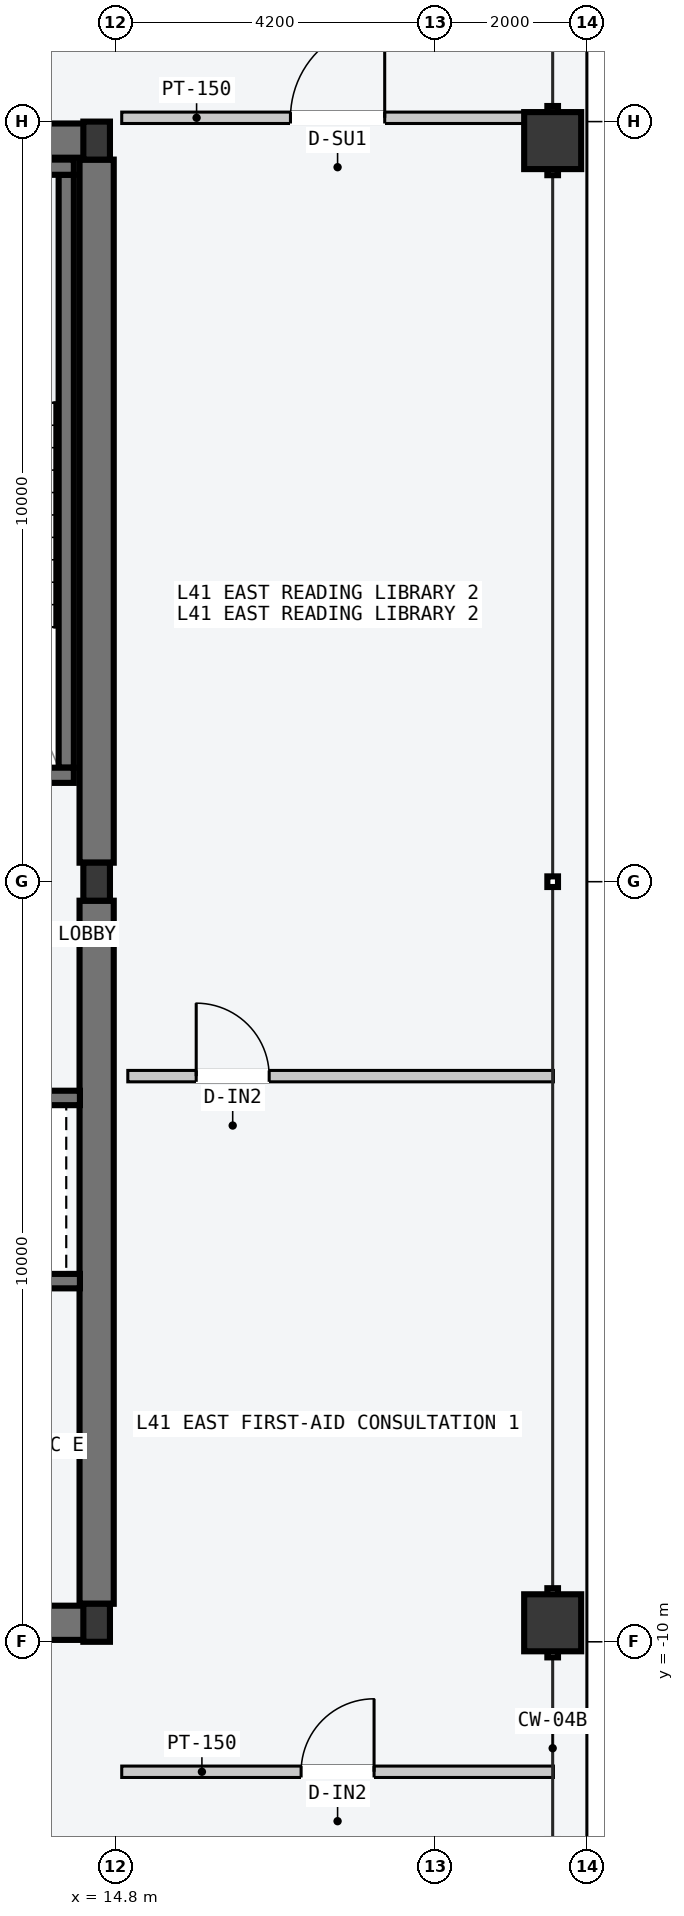
"""IFC4 building model, lengths in metres.
Left out: names, types, materials, properties, quantities, classifications, styles, units other than length and angle.
Written with IfcOpenShell. Run it as: python <this file> out.ifc"""

import sys

from ifc_helpers import new_model, si_unit, direction, frame, frame_2d, origin, origin_2d, place, context, subcontext, project, spatial, rectangle, hollow_rectangle, i_section, extrude, element, fill, save


model = new_model("IFC4")
c1 = context("Model", 3, precision=1e-05, world=origin(), true_north=direction((0.0, 1.0)))
c2 = subcontext(c1, "Body", "Model", "MODEL_VIEW")
j1 = project(units=[si_unit("LENGTHUNIT", "METRE"), si_unit("PLANEANGLEUNIT", "RADIAN")], contexts=[c1])
p1 = place(None, origin())
s1 = spatial("IfcSite", under=j1, at=p1, CompositionType="ELEMENT")
p2 = place(p1, origin())
s2 = spatial("IfcBuilding", under=s1, at=p2, CompositionType="ELEMENT")
p3 = place(p2, frame((0.0, 0.0, 158.7)))
s3 = spatial("IfcBuildingStorey", under=s2, at=p3, CompositionType="ELEMENT", Elevation=158.7)
for number, where, z_axis, x_axis in (
    (1, (8.07, -9.75, -0.2), (0.0, 0.0, 1.0), (1.0, 0.0, 0.0)),
    (2, (8.07, 9.75, -0.2), (0.0, 0.0, 1.0), (1.0, 0.0, 0.0)),
):
    element("IfcWall", number, at=place(p3, frame(where, z_axis=z_axis, x_axis=x_axis)), inside=s3, PredefinedType="SHEAR", context=c2, shape_type="SweptSolid", body=[
        extrude(rectangle(XDim=6.46, YDim=0.45, at=frame_2d((3.23, 0.0))), origin(), (0.0, 0.0, 1.0), 3.6),
    ])
for number, where, z_axis, x_axis in (
    (3, (14.55, -9.5, -0.2), (0.0, 0.0, 1.0), (0.0, 1.0, 0.0)),
    (4, (14.55, 0.25, -0.2), (0.0, 0.0, 1.0), (0.0, 1.0, 0.0)),
):
    element("IfcWall", number, at=place(p3, frame(where, z_axis=z_axis, x_axis=x_axis)), inside=s3, PredefinedType="SHEAR", context=c2, shape_type="SweptSolid", body=[
        extrude(rectangle(XDim=9.25, YDim=0.45, at=frame_2d((4.625, 0.0))), origin(), (0.0, 0.0, 1.0), 3.6),
    ])
p4 = place(p3, frame((14.15, 1.5, -0.2), z_axis=(0.0, 0.0, 1.0), x_axis=(0.0, 1.0, 0.0)))
e5 = element("IfcWall", 5, at=p4, inside=s3, PredefinedType="SOLIDWALL", context=c2, shape_type="SweptSolid", body=[
    extrude(rectangle(XDim=7.8, YDim=0.2, at=frame_2d((3.9, 0.0))), origin(), (0.0, 0.0, 1.0), 3.6),
])
p5 = place(p3, frame((10.53, 1.4, -0.2), z_axis=(0.0, 0.0, 1.0), x_axis=(1.0, 0.0, 0.0)))
e6 = element("IfcWall", 6, at=p5, inside=s3, PredefinedType="SOLIDWALL", context=c2, shape_type="SweptSolid", body=[
    extrude(rectangle(XDim=3.72, YDim=0.2, at=frame_2d((1.86, 0.0))), origin(), (0.0, 0.0, 1.0), 3.6),
])
p6 = place(p5, frame((1.5, 0.0, 0.2)))
e7 = element("IfcOpeningElement", 7, at=p6, cuts=e6, PredefinedType="OPENING", context=c2, shape_type="SweptSolid", body=[
    extrude(rectangle(XDim=1.12, YDim=2.18, at=frame_2d((0.56, 1.09))), frame((0.0, 0.11, 0.0), z_axis=(0.0, -1.0, 0.0), x_axis=(1.0, 0.0, 0.0)), (0.0, 0.0, 1.0), 0.22),
])
p7 = place(p3, frame((10.53, 9.4, -0.2), z_axis=(0.0, 0.0, 1.0), x_axis=(1.0, 0.0, 0.0)))
e8 = element("IfcWall", 8, at=p7, inside=s3, PredefinedType="SOLIDWALL", context=c2, shape_type="SweptSolid", body=[
    extrude(rectangle(XDim=3.72, YDim=0.2, at=frame_2d((1.86, 0.0))), origin(), (0.0, 0.0, 1.0), 3.6),
])
for number, where, z_axis, x_axis in (
    (9, (14.55, -9.75, 0.0), (0.0, 0.0, 1.0), (1.0, 0.0, 0.0)),
    (10, (14.55, 0.0, 0.0), (0.0, 0.0, 1.0), (1.0, 0.0, 0.0)),
    (11, (14.55, 9.75, 0.0), (0.0, 0.0, 1.0), (1.0, 0.0, 0.0)),
):
    element("IfcColumn", number, at=place(p3, frame(where, z_axis=z_axis, x_axis=x_axis)), inside=s3, PredefinedType="COLUMN", context=c2, shape_type="SweptSolid", body=[
        extrude(i_section(OverallWidth=0.35, OverallDepth=0.5, WebThickness=0.02, FlangeThickness=0.032, at=origin_2d()), origin(), (0.0, 0.0, 1.0), 3.6),
    ])
for number, where, z_axis, x_axis in (
    (12, (20.55, -9.75, 0.0), (0.0, 0.0, 1.0), (0.0, 1.0, 0.0)),
    (13, (20.55, 9.75, 0.0), (0.0, 0.0, 1.0), (0.0, 1.0, 0.0)),
):
    element("IfcColumn", number, at=place(p3, frame(where, z_axis=z_axis, x_axis=x_axis)), inside=s3, PredefinedType="COLUMN", context=c2, shape_type="SweptSolid", body=[
        extrude(hollow_rectangle(XDim=0.75, YDim=0.75, WallThickness=0.032, at=origin_2d()), origin(), (0.0, 0.0, 1.0), 3.6),
    ])
p8 = place(p3, frame((11.65, -2.845, -0.2), z_axis=(0.0, 0.0, 1.0), x_axis=(1.0, 0.0, 0.0)))
e14 = element("IfcWall", 14, at=p8, inside=s3, PredefinedType="SOLIDWALL", context=c2, shape_type="SweptSolid", body=[
    extrude(rectangle(XDim=2.68, YDim=0.19, at=frame_2d((1.34, 0.0))), origin(), (0.0, 0.0, 1.0), 3.6),
])
p9 = place(p8, frame((0.65, 0.0, 0.2)))
e15 = element("IfcOpeningElement", 15, at=p9, cuts=e14, PredefinedType="OPENING", context=c2, shape_type="SweptSolid", body=[
    extrude(rectangle(XDim=1.2, YDim=2.2, at=frame_2d((0.6, 1.1))), frame((0.0, 0.105, 0.0), z_axis=(0.0, -1.0, 0.0), x_axis=(1.0, 0.0, 0.0)), (0.0, 0.0, 1.0), 0.21),
])
p10 = place(p3, frame((11.65, -5.255, -0.2), z_axis=(0.0, 0.0, 1.0), x_axis=(1.0, 0.0, 0.0)))
e16 = element("IfcWall", 16, at=p10, inside=s3, PredefinedType="SOLIDWALL", context=c2, shape_type="SweptSolid", body=[
    extrude(rectangle(XDim=2.68, YDim=0.19, at=frame_2d((1.34, 0.0))), origin(), (0.0, 0.0, 1.0), 3.6),
])
p11 = place(p3, frame((14.88, 10.05, 0.0), z_axis=(0.0, 0.0, 1.0), x_axis=(1.0, 0.0, 0.0)))
e17 = element("IfcWall", 17, at=p11, inside=s3, PredefinedType="PARTITIONING", context=c2, shape_type="SweptSolid", body=[
    extrude(rectangle(XDim=5.68, YDim=0.15, at=frame_2d((2.84, 0.0))), origin(), (0.0, 0.0, 1.0), 3.4),
])
p12 = place(p11, frame((2.22, 0.0, 0.0)))
e18 = element("IfcOpeningElement", 18, at=p12, cuts=e17, PredefinedType="OPENING", context=c2, shape_type="SweptSolid", body=[
    extrude(rectangle(XDim=1.24, YDim=2.24, at=frame_2d((0.62, 1.12))), frame((0.0, 0.085, 0.0), z_axis=(0.0, -1.0, 0.0), x_axis=(1.0, 0.0, 0.0)), (0.0, 0.0, 1.0), 0.17),
])
p13 = place(p3, frame((14.88, -11.71, 0.0), z_axis=(0.0, 0.0, 1.0), x_axis=(1.0, 0.0, 0.0)))
e19 = element("IfcWall", 19, at=p13, inside=s3, PredefinedType="PARTITIONING", context=c2, shape_type="SweptSolid", body=[
    extrude(rectangle(XDim=5.68, YDim=0.15, at=frame_2d((2.84, 0.0))), origin(), (0.0, 0.0, 1.0), 3.4),
])
p14 = place(p13, frame((2.36, 0.0, 0.0)))
e20 = element("IfcOpeningElement", 20, at=p14, cuts=e19, PredefinedType="OPENING", context=c2, shape_type="SweptSolid", body=[
    extrude(rectangle(XDim=0.96, YDim=2.18, at=frame_2d((0.48, 1.09))), frame((0.0, 0.085, 0.0), z_axis=(0.0, -1.0, 0.0), x_axis=(1.0, 0.0, 0.0)), (0.0, 0.0, 1.0), 0.17),
])
p15 = place(p3, frame((14.96, -2.558, 0.0), z_axis=(0.0, 0.0, 1.0), x_axis=(1.0, 0.0, 0.0)))
e21 = element("IfcWall", 21, at=p15, inside=s3, PredefinedType="PARTITIONING", context=c2, shape_type="SweptSolid", body=[
    extrude(rectangle(XDim=5.6, YDim=0.15, at=frame_2d((2.8, 0.0))), origin(), (0.0, 0.0, 1.0), 3.4),
])
p16 = place(p15, frame((0.9, 0.0, 0.0)))
e22 = element("IfcOpeningElement", 22, at=p16, cuts=e21, PredefinedType="OPENING", context=c2, shape_type="SweptSolid", body=[
    extrude(rectangle(XDim=0.96, YDim=2.18, at=frame_2d((0.48, 1.09))), frame((0.0, 0.085, 0.0), z_axis=(0.0, -1.0, 0.0), x_axis=(1.0, 0.0, 0.0)), (0.0, 0.0, 1.0), 0.17),
])
p17 = place(p12, origin())
e23 = element("IfcDoor", 23, at=p17, inside=s3, OperationType="SINGLE_SWING_RIGHT", PredefinedType="DOOR", context=c2, shape_type="SweptSolid", body=[
    extrude(rectangle(XDim=1.24, YDim=2.24, at=frame_2d((0.62, 1.12))), frame((0.0, 0.025, 0.0), z_axis=(0.0, -1.0, 0.0), x_axis=(1.0, 0.0, 0.0)), (0.0, 0.0, 1.0), 0.05),
])
fill(e18, e23)
p18 = place(p14, origin())
e24 = element("IfcDoor", 24, at=p18, inside=s3, OperationType="SINGLE_SWING_RIGHT", PredefinedType="DOOR", context=c2, shape_type="SweptSolid", body=[
    extrude(rectangle(XDim=0.96, YDim=2.18, at=frame_2d((0.48, 1.09))), frame((0.0, 0.025, 0.0), z_axis=(0.0, -1.0, 0.0), x_axis=(1.0, 0.0, 0.0)), (0.0, 0.0, 1.0), 0.05),
])
fill(e20, e24)
p19 = place(p16, origin())
e25 = element("IfcDoor", 25, at=p19, inside=s3, OperationType="SINGLE_SWING_LEFT", PredefinedType="DOOR", context=c2, shape_type="SweptSolid", body=[
    extrude(rectangle(XDim=0.96, YDim=2.18, at=frame_2d((0.48, 1.09))), frame((0.0, 0.025, 0.0), z_axis=(0.0, -1.0, 0.0), x_axis=(1.0, 0.0, 0.0)), (0.0, 0.0, 1.0), 0.05),
])
fill(e22, e25)
save(model, sys.argv[1])
